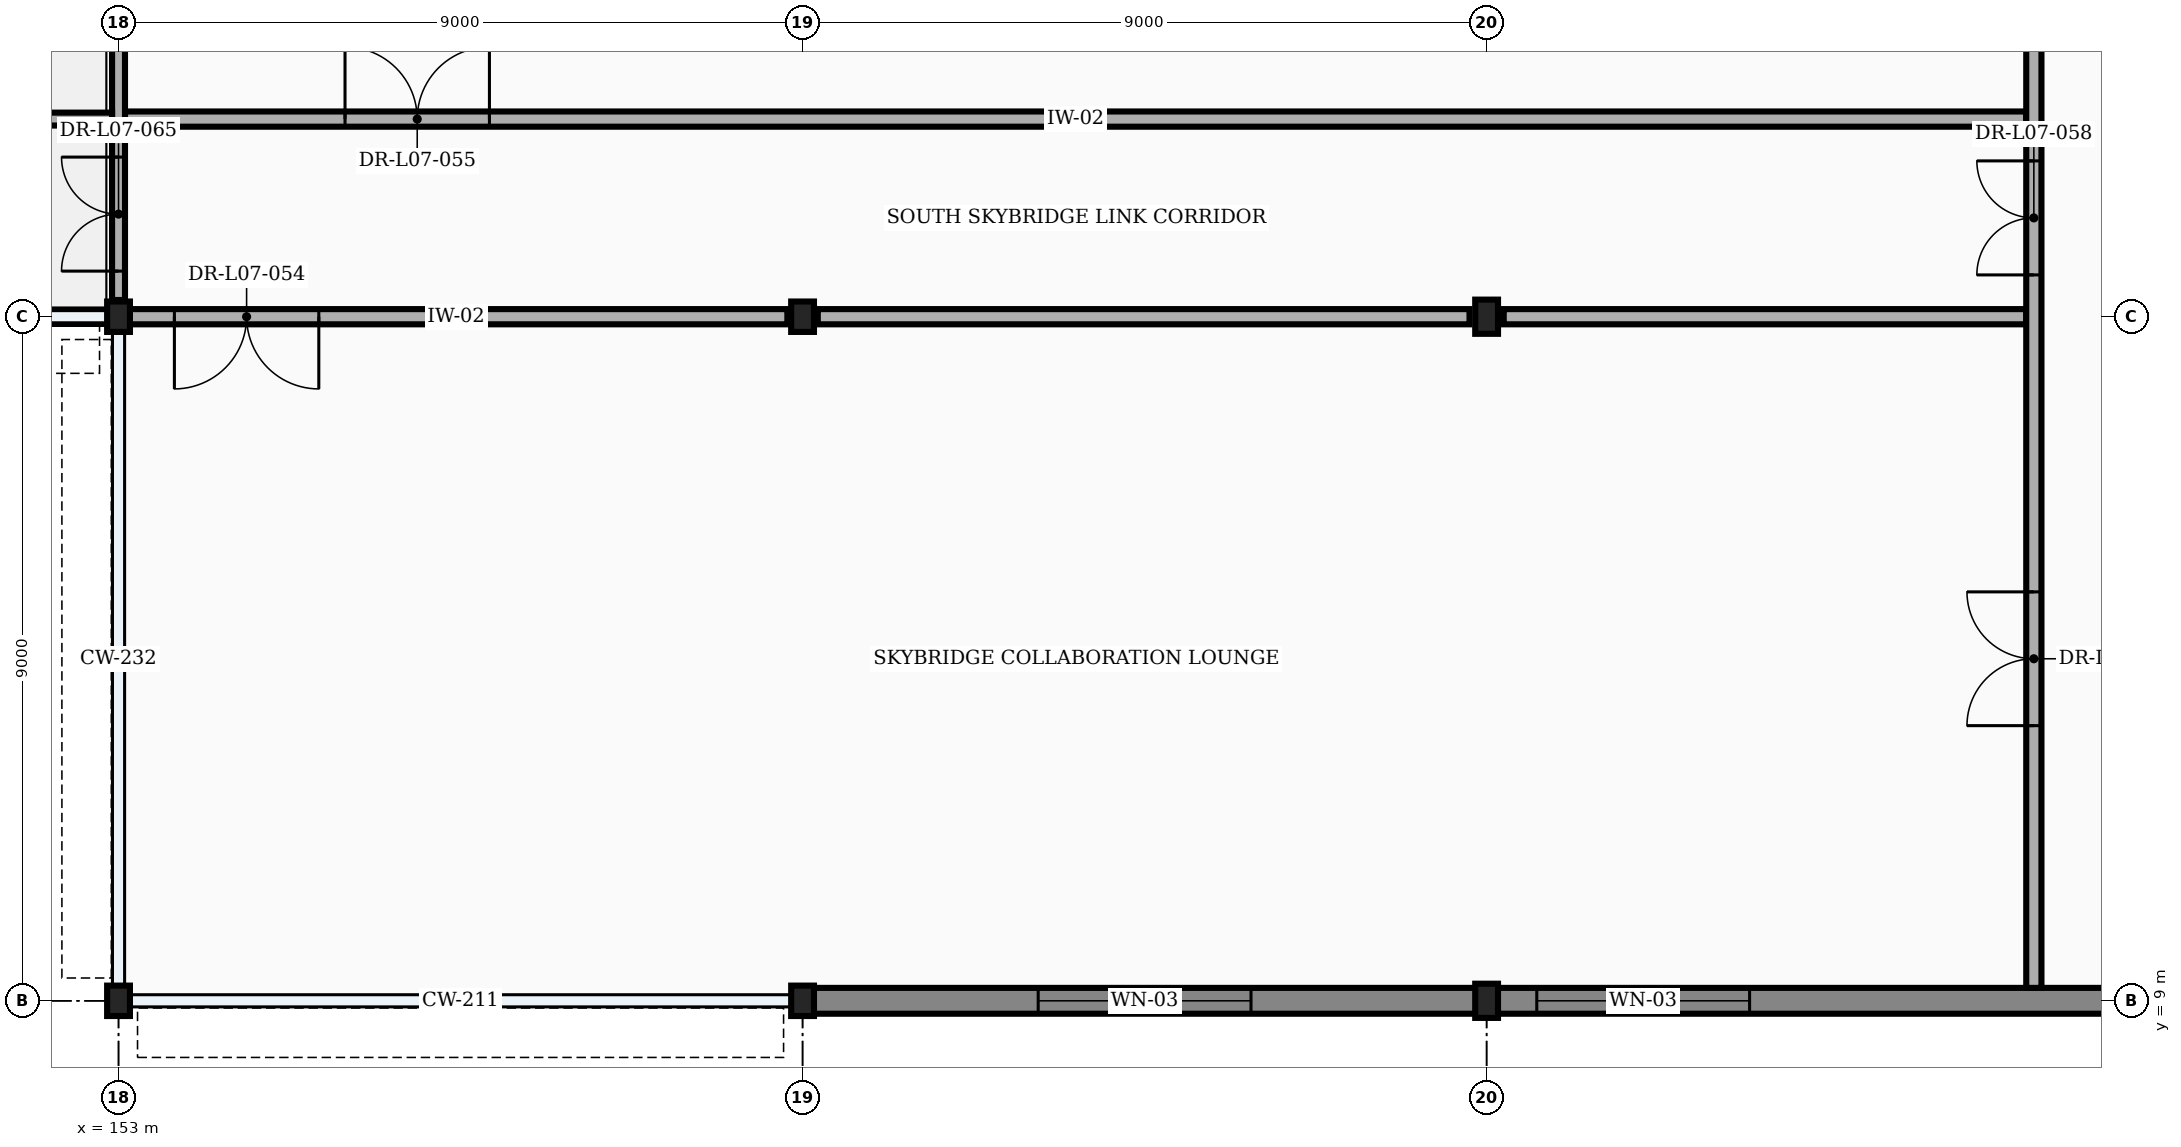
"""IFC4 building model, lengths in metres.
Left out: names, types, materials, properties, quantities, classifications, styles, units other than length and angle.
Written with IfcOpenShell. Run it as: python <this file> out.ifc"""

import sys

from ifc_helpers import new_model, si_unit, direction, frame, frame_2d, origin, origin_2d, place, context, subcontext, project, spatial, rectangle, i_section, extrude, element, fill, save


model = new_model("IFC4")
c1 = context("Model", 3, precision=1e-05, world=origin(), true_north=direction((0.0, 1.0)))
c2 = subcontext(c1, "Body", "Model", "MODEL_VIEW")
j1 = project(units=[si_unit("LENGTHUNIT", "METRE"), si_unit("PLANEANGLEUNIT", "RADIAN")], contexts=[c1])
p1 = place(None, origin())
s1 = spatial("IfcSite", under=j1, at=p1, CompositionType="ELEMENT")
p2 = place(p1, origin())
s2 = spatial("IfcBuilding", under=s1, at=p2, CompositionType="ELEMENT")
p3 = place(p2, frame((0.0, 0.0, 33.3)))
s3 = spatial("IfcBuildingStorey", under=s2, at=p3, CompositionType="ELEMENT", Elevation=33.3)
for number, where, z_axis, x_axis in (
    (1, (153.0, 9.0, 0.0), (0.0, 0.0, 1.0), (1.0, 0.0, 0.0)),
    (2, (153.0, 18.0, 0.0), (0.0, 0.0, 1.0), (1.0, 0.0, 0.0)),
    (3, (162.0, 9.0, 0.0), (0.0, 0.0, 1.0), (1.0, 0.0, 0.0)),
    (4, (162.0, 18.0, 0.0), (0.0, 0.0, 1.0), (1.0, 0.0, 0.0)),
):
    element("IfcColumn", number, at=place(p3, frame(where, z_axis=z_axis, x_axis=x_axis)), inside=s3, PredefinedType="COLUMN", context=c2, shape_type="SweptSolid", body=[
        extrude(i_section(OverallWidth=0.3, OverallDepth=0.4, WebThickness=0.013, FlangeThickness=0.024, FilletRadius=0.027, at=origin_2d()), origin(), (0.0, 0.0, 1.0), 4.5),
    ])
for number, where, z_axis, x_axis in (
    (5, (171.0, 9.0, 0.0), (0.0, 0.0, 1.0), (1.0, 0.0, 0.0)),
    (6, (171.0, 18.0, 0.0), (0.0, 0.0, 1.0), (1.0, 0.0, 0.0)),
):
    element("IfcColumn", number, at=place(p3, frame(where, z_axis=z_axis, x_axis=x_axis)), inside=s3, PredefinedType="COLUMN", context=c2, shape_type="SweptSolid", body=[
        extrude(i_section(OverallWidth=0.3, OverallDepth=0.45, WebThickness=0.014, FlangeThickness=0.026, FilletRadius=0.027, at=origin_2d()), origin(), (0.0, 0.0, 1.0), 4.5),
    ])
p4 = place(p3, frame((162.01, 9.0, 0.0), z_axis=(0.0, 0.0, 1.0), x_axis=(1.0, 0.0, 0.0)))
e7 = element("IfcWall", 7, at=p4, inside=s3, PredefinedType="STANDARD", context=c2, shape_type="SweptSolid", body=[
    extrude(rectangle(XDim=8.98, YDim=0.34, at=frame_2d((4.49, 0.0))), origin(), (0.0, 0.0, 1.0), 4.255),
])
p5 = place(p4, frame((3.09, 0.0, 0.85)))
e8 = element("IfcOpeningElement", 8, at=p5, cuts=e7, PredefinedType="OPENING", context=c2, shape_type="SweptSolid", body=[
    extrude(rectangle(XDim=2.8, YDim=2.25, at=frame_2d((1.4, 1.125))), frame((0.0, 0.182, 0.0), z_axis=(0.0, -1.0, 0.0), x_axis=(1.0, 0.0, 0.0)), (0.0, 0.0, 1.0), 0.364),
])
p6 = place(p3, frame((171.01, 9.0, 0.0), z_axis=(0.0, 0.0, 1.0), x_axis=(1.0, 0.0, 0.0)))
e9 = element("IfcWall", 9, at=p6, inside=s3, PredefinedType="STANDARD", context=c2, shape_type="SweptSolid", body=[
    extrude(rectangle(XDim=17.98, YDim=0.34, at=frame_2d((8.99, 0.0))), origin(), (0.0, 0.0, 1.0), 3.493),
])
p7 = place(p6, frame((0.65, 0.0, 0.85)))
e10 = element("IfcOpeningElement", 10, at=p7, cuts=e9, PredefinedType="OPENING", context=c2, shape_type="SweptSolid", body=[
    extrude(rectangle(XDim=2.8, YDim=2.25, at=frame_2d((1.4, 1.125))), frame((0.0, 0.182, 0.0), z_axis=(0.0, -1.0, 0.0), x_axis=(1.0, 0.0, 0.0)), (0.0, 0.0, 1.0), 0.364),
])
p8 = place(p3, frame((45.0, 18.0, 4.05), z_axis=(0.0, 0.0, 1.0), x_axis=(1.0, 0.0, 0.0)))
e11 = element("IfcWall", 11, at=p8, inside=s3, PredefinedType="PARAPET", context=c2, shape_type="SweptSolid", body=[
    extrude(rectangle(XDim=108.0, YDim=0.19, at=frame_2d((54.0, 0.0))), origin(), (0.0, 0.0, 1.0), 1.2),
])
p9 = place(p3, frame((153.085, 18.0, 0.0), z_axis=(0.0, 0.0, 1.0), x_axis=(1.0, 0.0, 0.0)))
e12 = element("IfcWall", 12, at=p9, inside=s3, PredefinedType="PARTITIONING", context=c2, shape_type="SweptSolid", body=[
    extrude(rectangle(XDim=8.715, YDim=0.2, at=frame_2d((4.357, 0.0))), origin(), (0.0, 0.0, 1.0), 3.872),
])
p10 = place(p9, frame((0.65, 0.0, 0.0)))
e13 = element("IfcOpeningElement", 13, at=p10, cuts=e12, PredefinedType="OPENING", context=c2, shape_type="SweptSolid", body=[
    extrude(rectangle(XDim=1.9, YDim=2.35, at=frame_2d((0.95, 1.175))), frame((0.0, 0.112, 0.0), z_axis=(0.0, -1.0, 0.0), x_axis=(1.0, 0.0, 0.0)), (0.0, 0.0, 1.0), 0.224),
])
p11 = place(p3, frame((162.2, 18.0, 0.0), z_axis=(0.0, 0.0, 1.0), x_axis=(1.0, 0.0, 0.0)))
e14 = element("IfcWall", 14, at=p11, inside=s3, PredefinedType="PARTITIONING", context=c2, shape_type="SweptSolid", body=[
    extrude(rectangle(XDim=8.575, YDim=0.2, at=frame_2d((4.288, 0.0))), origin(), (0.0, 0.0, 1.0), 3.952),
])
p12 = place(p3, frame((171.225, 18.0, 0.0), z_axis=(0.0, 0.0, 1.0), x_axis=(1.0, 0.0, 0.0)))
e15 = element("IfcWall", 15, at=p12, inside=s3, PredefinedType="PARTITIONING", context=c2, shape_type="SweptSolid", body=[
    extrude(rectangle(XDim=6.875, YDim=0.2, at=frame_2d((3.438, 0.0))), origin(), (0.0, 0.0, 1.0), 3.493),
])
p13 = place(p3, frame((153.085, 20.6, 0.0), z_axis=(0.0, 0.0, 1.0), x_axis=(1.0, 0.0, 0.0)))
e16 = element("IfcWall", 16, at=p13, inside=s3, PredefinedType="PARTITIONING", context=c2, shape_type="SweptSolid", body=[
    extrude(rectangle(XDim=25.015, YDim=0.2, at=frame_2d((12.508, 0.0))), origin(), (0.0, 0.0, 1.0), 4.255),
])
p14 = place(p13, frame((2.895, 0.0, 0.0)))
e17 = element("IfcOpeningElement", 17, at=p14, cuts=e16, PredefinedType="OPENING", context=c2, shape_type="SweptSolid", body=[
    extrude(rectangle(XDim=1.9, YDim=2.35, at=frame_2d((0.95, 1.175))), frame((0.0, 0.112, 0.0), z_axis=(0.0, -1.0, 0.0), x_axis=(1.0, 0.0, 0.0)), (0.0, 0.0, 1.0), 0.224),
])
p15 = place(p3, frame((178.2, 9.17, 0.0), z_axis=(0.0, 0.0, 1.0), x_axis=(0.0, 1.0, 0.0)))
e18 = element("IfcWall", 18, at=p15, inside=s3, PredefinedType="PARTITIONING", context=c2, shape_type="SweptSolid", body=[
    extrude(rectangle(XDim=30.07, YDim=0.2, at=frame_2d((15.035, 0.0))), origin(), (0.0, 0.0, 1.0), 4.255),
])
p16 = place(p15, frame((3.45, 0.0, 0.0)))
e19 = element("IfcOpeningElement", 19, at=p16, cuts=e18, PredefinedType="OPENING", context=c2, shape_type="SweptSolid", body=[
    extrude(rectangle(XDim=1.76, YDim=2.35, at=frame_2d((0.88, 1.175))), frame((0.0, 0.112, 0.0), z_axis=(0.0, -1.0, 0.0), x_axis=(1.0, 0.0, 0.0)), (0.0, 0.0, 1.0), 0.224),
])
p17 = place(p15, frame((9.38, 0.0, 0.0)))
e20 = element("IfcOpeningElement", 20, at=p17, cuts=e18, PredefinedType="OPENING", context=c2, shape_type="SweptSolid", body=[
    extrude(rectangle(XDim=1.5, YDim=2.2, at=frame_2d((0.75, 1.1))), frame((0.0, 0.112, 0.0), z_axis=(0.0, -1.0, 0.0), x_axis=(1.0, 0.0, 0.0)), (0.0, 0.0, 1.0), 0.224),
])
p18 = place(p15, frame((27.68, 0.0, 0.0)))
e21 = element("IfcOpeningElement", 21, at=p18, cuts=e18, PredefinedType="OPENING", context=c2, shape_type="SweptSolid", body=[
    extrude(rectangle(XDim=1.9, YDim=2.35, at=frame_2d((0.95, 1.175))), frame((0.0, 0.112, 0.0), z_axis=(0.0, -1.0, 0.0), x_axis=(1.0, 0.0, 0.0)), (0.0, 0.0, 1.0), 0.224),
])
p19 = place(p3, frame((153.0, 18.22, 0.0), z_axis=(0.0, 0.0, 1.0), x_axis=(0.0, 1.0, 0.0)))
e22 = element("IfcWall", 22, at=p19, inside=s3, PredefinedType="PARTITIONING", context=c2, shape_type="SweptSolid", body=[
    extrude(rectangle(XDim=8.56, YDim=0.17, at=frame_2d((4.28, 0.0))), origin(), (0.0, 0.0, 1.0), 3.925),
])
p20 = place(p19, frame((0.38, 0.0, 0.0)))
e23 = element("IfcOpeningElement", 23, at=p20, cuts=e22, PredefinedType="OPENING", context=c2, shape_type="SweptSolid", body=[
    extrude(rectangle(XDim=1.5, YDim=2.2, at=frame_2d((0.75, 1.1))), frame((0.0, 0.097, 0.0), z_axis=(0.0, -1.0, 0.0), x_axis=(1.0, 0.0, 0.0)), (0.0, 0.0, 1.0), 0.194),
])
p21 = place(p3, frame((45.085, 20.6, 0.0), z_axis=(0.0, 0.0, 1.0), x_axis=(1.0, 0.0, 0.0)))
e24 = element("IfcWall", 24, at=p21, inside=s3, PredefinedType="PARTITIONING", context=c2, shape_type="SweptSolid", body=[
    extrude(rectangle(XDim=107.83, YDim=0.17, at=frame_2d((53.915, 0.0))), origin(), (0.0, 0.0, 1.0), 4.255),
])
p22 = place(p21, frame((14.34, 0.0, 0.0)))
e25 = element("IfcOpeningElement", 25, at=p22, cuts=e24, PredefinedType="OPENING", context=c2, shape_type="SweptSolid", body=[
    extrude(rectangle(XDim=1.15, YDim=2.15, at=frame_2d((0.575, 1.075))), frame((0.0, 0.097, 0.0), z_axis=(0.0, -1.0, 0.0), x_axis=(1.0, 0.0, 0.0)), (0.0, 0.0, 1.0), 0.194),
])
p23 = place(p21, frame((104.34, 0.0, 0.0)))
e26 = element("IfcOpeningElement", 26, at=p23, cuts=e24, PredefinedType="OPENING", context=c2, shape_type="SweptSolid", body=[
    extrude(rectangle(XDim=1.15, YDim=2.15, at=frame_2d((0.575, 1.075))), frame((0.0, 0.097, 0.0), z_axis=(0.0, -1.0, 0.0), x_axis=(1.0, 0.0, 0.0)), (0.0, 0.0, 1.0), 0.194),
])
p24 = place(p21, frame((10.85, 0.0, 0.0)))
e27 = element("IfcOpeningElement", 27, at=p24, cuts=e24, PredefinedType="OPENING", context=c2, shape_type="SweptSolid", body=[
    extrude(rectangle(XDim=1.9, YDim=2.35, at=frame_2d((0.95, 1.175))), frame((0.0, 0.097, 0.0), z_axis=(0.0, -1.0, 0.0), x_axis=(1.0, 0.0, 0.0)), (0.0, 0.0, 1.0), 0.194),
])
p25 = place(p21, frame((100.865, 0.0, 0.0)))
e28 = element("IfcOpeningElement", 28, at=p25, cuts=e24, PredefinedType="OPENING", context=c2, shape_type="SweptSolid", body=[
    extrude(rectangle(XDim=1.9, YDim=2.35, at=frame_2d((0.95, 1.175))), frame((0.0, 0.097, 0.0), z_axis=(0.0, -1.0, 0.0), x_axis=(1.0, 0.0, 0.0)), (0.0, 0.0, 1.0), 0.194),
])
p26 = place(p5, origin())
e29 = element("IfcWindow", 29, at=p26, inside=s3, PartitioningType="SINGLE_PANEL", PredefinedType="WINDOW", context=c2, shape_type="SweptSolid", body=[
    extrude(rectangle(XDim=2.8, YDim=2.25, at=frame_2d((1.4, 1.125))), frame((0.0, 0.03, 0.0), z_axis=(0.0, -1.0, 0.0), x_axis=(1.0, 0.0, 0.0)), (0.0, 0.0, 1.0), 0.06),
])
fill(e8, e29)
p27 = place(p7, origin())
e30 = element("IfcWindow", 30, at=p27, inside=s3, PartitioningType="SINGLE_PANEL", PredefinedType="WINDOW", context=c2, shape_type="SweptSolid", body=[
    extrude(rectangle(XDim=2.8, YDim=2.25, at=frame_2d((1.4, 1.125))), frame((0.0, 0.03, 0.0), z_axis=(0.0, -1.0, 0.0), x_axis=(1.0, 0.0, 0.0)), (0.0, 0.0, 1.0), 0.06),
])
fill(e10, e30)
p28 = place(p10, frame((1.9, 0.0, 0.0), z_axis=(0.0, 0.0, 1.0), x_axis=(-1.0, 0.0, 0.0)))
e31 = element("IfcDoor", 31, at=p28, inside=s3, OperationType="DOUBLE_DOOR_SINGLE_SWING", PredefinedType="DOOR", context=c2, shape_type="SweptSolid", body=[
    extrude(rectangle(XDim=1.9, YDim=2.35, at=frame_2d((0.95, 1.175))), frame((0.0, 0.025, 0.0), z_axis=(0.0, -1.0, 0.0), x_axis=(1.0, 0.0, 0.0)), (0.0, 0.0, 1.0), 0.05),
])
fill(e13, e31)
p29 = place(p14, origin())
e32 = element("IfcDoor", 32, at=p29, inside=s3, OperationType="DOUBLE_DOOR_SINGLE_SWING", PredefinedType="DOOR", context=c2, shape_type="SweptSolid", body=[
    extrude(rectangle(XDim=1.9, YDim=2.35, at=frame_2d((0.95, 1.175))), frame((0.0, 0.025, 0.0), z_axis=(0.0, -1.0, 0.0), x_axis=(1.0, 0.0, 0.0)), (0.0, 0.0, 1.0), 0.05),
])
fill(e17, e32)
p30 = place(p16, origin())
e33 = element("IfcDoor", 33, at=p30, inside=s3, OperationType="DOUBLE_DOOR_SINGLE_SWING", PredefinedType="DOOR", context=c2, shape_type="SweptSolid", body=[
    extrude(rectangle(XDim=1.76, YDim=2.35, at=frame_2d((0.88, 1.175))), frame((0.0, 0.025, 0.0), z_axis=(0.0, -1.0, 0.0), x_axis=(1.0, 0.0, 0.0)), (0.0, 0.0, 1.0), 0.05),
])
fill(e19, e33)
p31 = place(p17, origin())
e34 = element("IfcDoor", 34, at=p31, inside=s3, OperationType="DOUBLE_DOOR_SINGLE_SWING", PredefinedType="DOOR", context=c2, shape_type="SweptSolid", body=[
    extrude(rectangle(XDim=1.5, YDim=2.2, at=frame_2d((0.75, 1.1))), frame((0.0, 0.025, 0.0), z_axis=(0.0, -1.0, 0.0), x_axis=(1.0, 0.0, 0.0)), (0.0, 0.0, 1.0), 0.05),
])
fill(e20, e34)
p32 = place(p20, origin())
e35 = element("IfcDoor", 35, at=p32, inside=s3, OperationType="DOUBLE_DOOR_SINGLE_SWING", PredefinedType="DOOR", context=c2, shape_type="SweptSolid", body=[
    extrude(rectangle(XDim=1.5, YDim=2.2, at=frame_2d((0.75, 1.1))), frame((0.0, 0.025, 0.0), z_axis=(0.0, -1.0, 0.0), x_axis=(1.0, 0.0, 0.0)), (0.0, 0.0, 1.0), 0.05),
])
fill(e23, e35)
save(model, sys.argv[1])
